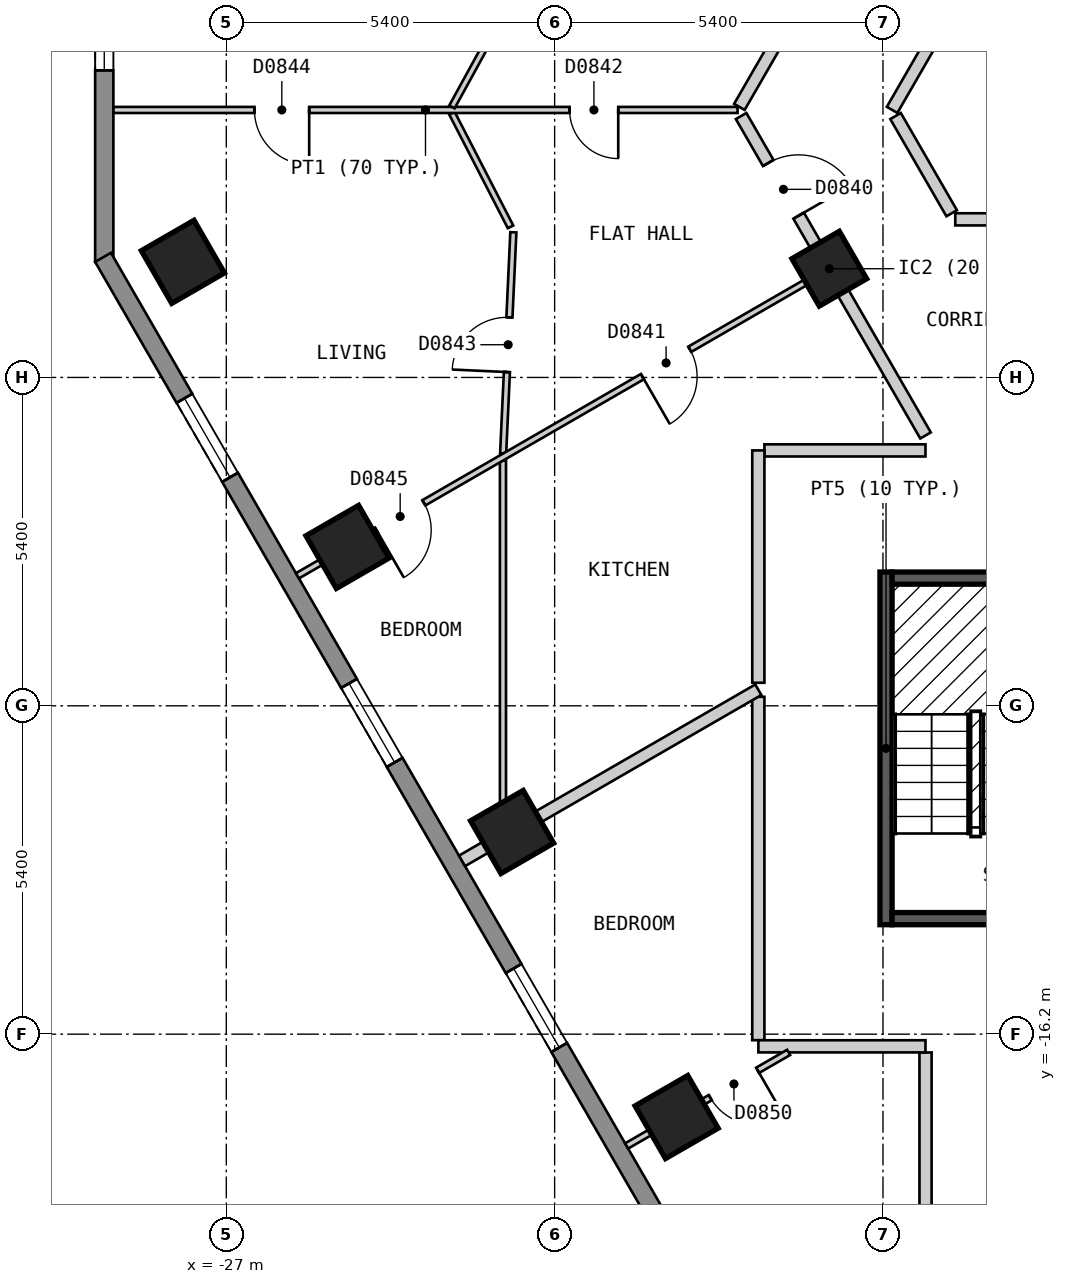
"""IFC4 building model, lengths in metres.
Left out: names, types, materials, properties, quantities, classifications, styles, units other than length and angle.
Written with IfcOpenShell. Run it as: python <this file> out.ifc"""

import sys

from ifc_helpers import new_model, si_unit, direction, frame, frame_2d, origin, origin_2d, place, context, subcontext, project, spatial, polyline, rectangle, outline, extrude, element, fill, save


model = new_model("IFC4")
c1 = context("Model", 3, precision=1e-05, world=origin(), true_north=direction((0.0, 1.0)))
c2 = subcontext(c1, "Body", "Model", "MODEL_VIEW")
j1 = project(units=[si_unit("LENGTHUNIT", "METRE"), si_unit("PLANEANGLEUNIT", "RADIAN")], contexts=[c1])
p1 = place(None, origin())
s1 = spatial("IfcSite", under=j1, at=p1, CompositionType="ELEMENT")
p2 = place(p1, origin())
s2 = spatial("IfcBuilding", under=s1, at=p2, CompositionType="ELEMENT")
p3 = place(p2, frame((0.0, 0.0, 84.0)))
s3 = spatial("IfcBuildingStorey", under=s2, at=p3, CompositionType="ELEMENT", Elevation=84.0)
for number, where, z_axis, x_axis in (
    (1, (-27.714, -3.499, 0.0), (0.0, 0.0, 1.0), (0.5, -0.866, 0.0)),
    (2, (-25.007, -8.187, 0.0), (0.0, 0.0, 1.0), (0.5, -0.866, 0.0)),
    (3, (-22.3, -12.875, 0.0), (0.0, 0.0, 1.0), (0.5, -0.866, 0.0)),
    (4, (-19.594, -17.563, 0.0), (0.0, 0.0, 1.0), (0.5, -0.866, 0.0)),
):
    element("IfcColumn", number, at=place(p3, frame(where, z_axis=z_axis, x_axis=x_axis)), inside=s3, PredefinedType="COLUMN", context=c2, shape_type="SweptSolid", body=[
        extrude(rectangle(XDim=1.0, YDim=1.0, at=origin_2d()), origin(), (0.0, 0.0, 1.0), 3.0),
    ])
p4 = place(p3, frame((-17.083, -3.612, 0.0), z_axis=(0.0, 0.0, 1.0), x_axis=(0.5, -0.866025403784, 0.0)))
e5 = element("IfcColumn", 5, at=p4, inside=s3, PredefinedType="COLUMN", context=c2, shape_type="SweptSolid", body=[
    extrude(rectangle(XDim=0.9, YDim=0.9, at=origin_2d()), origin(), (0.0, 0.0, 1.0), 3.0),
])
p5 = place(p3, frame((-29.007, 1.5, 0.0), z_axis=(0.0, 0.0, 1.0), x_axis=(0.0, -1.0, 0.0)))
e6 = element("IfcWall", 6, at=p5, inside=s3, PredefinedType="SOLIDWALL", context=c2, shape_type="SweptSolid", body=[
    extrude(outline(polyline([(0.0, -0.15), (5.0, -0.15), (4.92, 0.15), (0.08, 0.15), (0.0, -0.15)])), origin(), (0.0, 0.0, 1.0), 2.7),
])
p6 = place(p5, frame((0.65, 0.0, 0.15)))
e7 = element("IfcOpeningElement", 7, at=p6, cuts=e6, PredefinedType="OPENING", context=c2, shape_type="SweptSolid", body=[
    extrude(rectangle(XDim=1.2, YDim=2.1, at=frame_2d((0.6, 1.05))), frame((0.0, 0.16, 0.0), z_axis=(0.0, -1.0, 0.0), x_axis=(1.0, 0.0, 0.0)), (0.0, 0.0, 1.0), 0.32),
])
p7 = place(p3, frame((-29.027, -3.425, 0.0), z_axis=(0.0, 0.0, 1.0), x_axis=(0.500035407905, -0.866004960056, 0.0)))
e8 = element("IfcWall", 8, at=p7, inside=s3, PredefinedType="SOLIDWALL", context=c2, shape_type="SweptSolid", body=[
    extrude(outline(polyline([(0.0, -0.15), (23.094, -0.15), (23.014, 0.15), (0.08, 0.15), (0.0, -0.15)])), origin(), (0.0, 0.0, 1.0), 2.7),
])
p8 = place(p7, frame((2.677, 0.0, 0.15)))
e9 = element("IfcOpeningElement", 9, at=p8, cuts=e8, PredefinedType="OPENING", context=c2, shape_type="SweptSolid", body=[
    extrude(rectangle(XDim=1.5, YDim=2.1, at=frame_2d((0.75, 1.05))), frame((0.0, 0.16, 0.0), z_axis=(0.0, -1.0, 0.0), x_axis=(1.0, 0.0, 0.0)), (0.0, 0.0, 1.0), 0.32),
])
p9 = place(p7, frame((8.091, 0.0, 0.15)))
e10 = element("IfcOpeningElement", 10, at=p9, cuts=e8, PredefinedType="OPENING", context=c2, shape_type="SweptSolid", body=[
    extrude(rectangle(XDim=1.5, YDim=2.1, at=frame_2d((0.75, 1.05))), frame((0.0, 0.16, 0.0), z_axis=(0.0, -1.0, 0.0), x_axis=(1.0, 0.0, 0.0)), (0.0, 0.0, 1.0), 0.32),
])
p10 = place(p7, frame((13.504, 0.0, 0.15)))
e11 = element("IfcOpeningElement", 11, at=p10, cuts=e8, PredefinedType="OPENING", context=c2, shape_type="SweptSolid", body=[
    extrude(rectangle(XDim=1.5, YDim=2.1, at=frame_2d((0.75, 1.05))), frame((0.0, 0.16, 0.0), z_axis=(0.0, -1.0, 0.0), x_axis=(1.0, 0.0, 0.0)), (0.0, 0.0, 1.0), 0.32),
])
p11 = place(p7, frame((18.917, 0.0, 0.15)))
e12 = element("IfcOpeningElement", 12, at=p11, cuts=e8, PredefinedType="OPENING", context=c2, shape_type="SweptSolid", body=[
    extrude(rectangle(XDim=1.5, YDim=2.1, at=frame_2d((0.75, 1.05))), frame((0.0, 0.16, 0.0), z_axis=(0.0, -1.0, 0.0), x_axis=(1.0, 0.0, 0.0)), (0.0, 0.0, 1.0), 0.32),
])
p12 = place(p3, frame((-15.993, -1.101, 0.0), z_axis=(0.0, 0.0, 1.0), x_axis=(0.499894174133, -0.866086493757, 0.0)))
e13 = element("IfcWall", 13, at=p12, inside=s3, PredefinedType="PARTITIONING", context=c2, shape_type="SweptSolid", body=[
    extrude(rectangle(XDim=1.846, YDim=0.2, at=frame_2d((0.923, 0.0))), origin(), (0.0, 0.0, 1.0), 2.7),
])
p13 = place(p3, frame((-18.533, -1.101, 0.0), z_axis=(0.0, 0.0, 1.0), x_axis=(0.500022085096, -0.866012652573, 0.0)))
e14 = element("IfcWall", 14, at=p13, inside=s3, PredefinedType="PARTITIONING", context=c2, shape_type="SweptSolid", body=[
    extrude(rectangle(XDim=6.066, YDim=0.2, at=frame_2d((3.033, 0.0))), origin(), (0.0, 0.0, 1.0), 2.7),
])
p14 = place(p13, frame((0.892, 0.0, 0.0)))
e15 = element("IfcOpeningElement", 15, at=p14, cuts=e14, PredefinedType="OPENING", context=c2, shape_type="SweptSolid", body=[
    extrude(rectangle(XDim=1.0, YDim=2.1, at=frame_2d((0.5, 1.05))), frame((0.0, 0.11, 0.0), z_axis=(0.0, -1.0, 0.0), x_axis=(1.0, 0.0, 0.0)), (0.0, 0.0, 1.0), 0.22),
])
p15 = place(p3, frame((-15.5, -16.501, 0.0), z_axis=(0.0, 0.0, 1.0), x_axis=(0.0, -1.0, 0.0)))
e16 = element("IfcWall", 16, at=p15, inside=s3, PredefinedType="PARTITIONING", context=c2, shape_type="SweptSolid", body=[
    extrude(rectangle(XDim=4.598, YDim=0.2, at=frame_2d((2.299, 0.0))), origin(), (0.0, 0.0, 1.0), 2.7),
])
p16 = place(p3, frame((-18.25, -10.652, 0.0), z_axis=(0.0, 0.0, 1.0), x_axis=(0.0, -1.0, 0.0)))
e17 = element("IfcWall", 17, at=p16, inside=s3, PredefinedType="PARTITIONING", context=c2, shape_type="SweptSolid", body=[
    extrude(rectangle(XDim=5.647, YDim=0.2, at=frame_2d((2.823, 0.0))), origin(), (0.0, 0.0, 1.0), 2.7),
])
p17 = place(p3, frame((-18.15, -6.6, 0.0), z_axis=(0.0, 0.0, 1.0), x_axis=(1.0, 0.0, 0.0)))
e18 = element("IfcWall", 18, at=p17, inside=s3, PredefinedType="PARTITIONING", context=c2, shape_type="SweptSolid", body=[
    extrude(rectangle(XDim=2.649, YDim=0.2, at=frame_2d((1.324, 0.0))), origin(), (0.0, 0.0, 1.0), 2.7),
])
p18 = place(p3, frame((-18.249, -16.4, 0.0), z_axis=(0.0, 0.0, 1.0), x_axis=(1.0, 0.0, 0.0)))
e19 = element("IfcWall", 19, at=p18, inside=s3, PredefinedType="PARTITIONING", context=c2, shape_type="SweptSolid", body=[
    extrude(rectangle(XDim=2.748, YDim=0.2, at=frame_2d((1.374, 0.0))), origin(), (0.0, 0.0, 1.0), 2.7),
])
p19 = place(p3, frame((-15.011, -2.8, 0.0), z_axis=(0.0, 0.0, 1.0), x_axis=(1.0, 0.0, 0.0)))
e20 = element("IfcWall", 20, at=p19, inside=s3, PredefinedType="PARTITIONING", context=c2, shape_type="SweptSolid", body=[
    extrude(rectangle(XDim=7.982, YDim=0.2, at=frame_2d((3.991, 0.0))), origin(), (0.0, 0.0, 1.0), 2.7),
])
p20 = place(p3, frame((-16.05, -1.0, 0.0), z_axis=(0.0, 0.0, 1.0), x_axis=(0.499962449088, 0.866047082728, 0.0)))
e21 = element("IfcWall", 21, at=p20, inside=s3, PredefinedType="PARTITIONING", context=c2, shape_type="SweptSolid", body=[
    extrude(rectangle(XDim=10.391, YDim=0.2, at=frame_2d((5.195, 0.0))), origin(), (0.0, 0.0, 1.0), 2.7),
])
p21 = place(p20, frame((4.745, 0.0, 0.0)))
e22 = element("IfcOpeningElement", 22, at=p21, cuts=e21, PredefinedType="OPENING", context=c2, shape_type="SweptSolid", body=[
    extrude(rectangle(XDim=0.9, YDim=2.1, at=frame_2d((0.45, 1.05))), frame((0.0, 0.11, 0.0), z_axis=(0.0, -1.0, 0.0), x_axis=(1.0, 0.0, 0.0)), (0.0, 0.0, 1.0), 0.22),
])
p22 = place(p3, frame((-18.562, -0.951, 0.0), z_axis=(0.0, 0.0, 1.0), x_axis=(0.499992962407, 0.866029466902, 0.0)))
e23 = element("IfcWall", 23, at=p22, inside=s3, PredefinedType="PARTITIONING", context=c2, shape_type="SweptSolid", body=[
    extrude(rectangle(XDim=20.208, YDim=0.2, at=frame_2d((10.104, 0.0))), origin(), (0.0, 0.0, 1.0), 2.7),
])
p23 = place(p22, frame((14.627, 0.0, 0.0)))
e24 = element("IfcOpeningElement", 24, at=p23, cuts=e23, PredefinedType="OPENING", context=c2, shape_type="SweptSolid", body=[
    extrude(rectangle(XDim=1.0, YDim=2.1, at=frame_2d((0.5, 1.05))), frame((0.0, 0.11, 0.0), z_axis=(0.0, -1.0, 0.0), x_axis=(1.0, 0.0, 0.0)), (0.0, 0.0, 1.0), 0.22),
])
p24 = place(p22, frame((4.581, 0.0, 0.0)))
e25 = element("IfcOpeningElement", 25, at=p24, cuts=e23, PredefinedType="OPENING", context=c2, shape_type="SweptSolid", body=[
    extrude(rectangle(XDim=1.0, YDim=2.1, at=frame_2d((0.5, 1.05))), frame((0.0, 0.11, 0.0), z_axis=(0.0, -1.0, 0.0), x_axis=(1.0, 0.0, 0.0)), (0.0, 0.0, 1.0), 0.22),
])
p25 = place(p3, frame((-18.25, -10.421, 0.0), z_axis=(0.0, 0.0, 1.0), x_axis=(0.0, 1.0, 0.0)))
e26 = element("IfcWall", 26, at=p25, inside=s3, PredefinedType="PARTITIONING", context=c2, shape_type="SweptSolid", body=[
    extrude(rectangle(XDim=3.821, YDim=0.2, at=frame_2d((1.91, 0.0))), origin(), (0.0, 0.0, 1.0), 2.7),
])
p26 = place(p3, frame((-23.289, -1.054, 0.0), z_axis=(0.0, 0.0, 1.0), x_axis=(0.458226112305, -0.888835659726, 0.0)))
e27 = element("IfcWall", 27, at=p26, inside=s3, PredefinedType="PARTITIONING", context=c2, shape_type="SweptSolid", body=[
    extrude(rectangle(XDim=2.104, YDim=0.1, at=frame_2d((1.052, 0.0))), origin(), (0.0, 0.0, 1.0), 2.7),
])
p27 = place(p3, frame((-28.857, -1.001, 0.0), z_axis=(0.0, 0.0, 1.0), x_axis=(1.0, 0.0, 0.0)))
e28 = element("IfcWall", 28, at=p27, inside=s3, PredefinedType="PARTITIONING", context=c2, shape_type="SweptSolid", body=[
    extrude(rectangle(XDim=10.266, YDim=0.1, at=frame_2d((5.133, 0.0))), origin(), (0.0, 0.0, 1.0), 2.7),
])
p28 = place(p27, frame((7.503, 0.0, 0.0)))
e29 = element("IfcOpeningElement", 29, at=p28, cuts=e28, PredefinedType="OPENING", context=c2, shape_type="SweptSolid", body=[
    extrude(rectangle(XDim=0.8, YDim=2.1, at=frame_2d((0.4, 1.05))), frame((0.0, 0.06, 0.0), z_axis=(0.0, -1.0, 0.0), x_axis=(1.0, 0.0, 0.0)), (0.0, 0.0, 1.0), 0.12),
])
p29 = place(p27, frame((2.32, 0.0, 0.0)))
e30 = element("IfcOpeningElement", 30, at=p29, cuts=e28, PredefinedType="OPENING", context=c2, shape_type="SweptSolid", body=[
    extrude(rectangle(XDim=0.9, YDim=2.1, at=frame_2d((0.45, 1.05))), frame((0.0, 0.06, 0.0), z_axis=(0.0, -1.0, 0.0), x_axis=(1.0, 0.0, 0.0)), (0.0, 0.0, 1.0), 0.12),
])
p30 = place(p3, frame((-23.289, -0.951, 0.0), z_axis=(0.0, 0.0, 1.0), x_axis=(0.481164463081, 0.876630343684, 0.0)))
e31 = element("IfcWall", 31, at=p30, inside=s3, PredefinedType="PARTITIONING", context=c2, shape_type="SweptSolid", body=[
    extrude(rectangle(XDim=4.834, YDim=0.1, at=frame_2d((2.417, 0.0))), origin(), (0.0, 0.0, 1.0), 2.7),
])
p31 = place(p3, frame((-22.447, -6.651, 0.0), z_axis=(0.0, 0.0, 1.0), x_axis=(0.046122262393, 0.998935802197, 0.0)))
e32 = element("IfcWall", 32, at=p31, inside=s3, PredefinedType="PARTITIONING", context=c2, shape_type="SweptSolid", body=[
    extrude(rectangle(XDim=3.642, YDim=0.1, at=frame_2d((1.821, 0.0))), origin(), (0.0, 0.0, 1.0), 2.7),
])
p32 = place(p31, frame((1.341, 0.0, 0.0)))
e33 = element("IfcOpeningElement", 33, at=p32, cuts=e32, PredefinedType="OPENING", context=c2, shape_type="SweptSolid", body=[
    extrude(rectangle(XDim=0.9, YDim=2.1, at=frame_2d((0.45, 1.05))), frame((0.0, 0.06, 0.0), z_axis=(0.0, -1.0, 0.0), x_axis=(1.0, 0.0, 0.0)), (0.0, 0.0, 1.0), 0.12),
])
p33 = place(p3, frame((-22.45, -12.846, 0.0), z_axis=(0.0, 0.0, 1.0), x_axis=(0.0, 1.0, 0.0)))
e34 = element("IfcWall", 34, at=p33, inside=s3, PredefinedType="PARTITIONING", context=c2, shape_type="SweptSolid", body=[
    extrude(rectangle(XDim=6.078, YDim=0.1, at=frame_2d((3.039, 0.0))), origin(), (0.0, 0.0, 1.0), 2.7),
])
p34 = place(p3, frame((-20.416, -18.038, 0.0), z_axis=(0.0, 0.0, 1.0), x_axis=(0.866026989333, 0.499997253739, 0.0)))
e35 = element("IfcWall", 35, at=p34, inside=s3, PredefinedType="PARTITIONING", context=c2, shape_type="SweptSolid", body=[
    extrude(rectangle(XDim=3.076, YDim=0.1, at=frame_2d((1.538, 0.0))), origin(), (0.0, 0.0, 1.0), 2.7),
])
p35 = place(p34, frame((1.588, 0.0, 0.0)))
e36 = element("IfcOpeningElement", 36, at=p35, cuts=e35, PredefinedType="OPENING", context=c2, shape_type="SweptSolid", body=[
    extrude(rectangle(XDim=0.9, YDim=2.1, at=frame_2d((0.45, 1.05))), frame((0.0, 0.06, 0.0), z_axis=(0.0, -1.0, 0.0), x_axis=(1.0, 0.0, 0.0)), (0.0, 0.0, 1.0), 0.12),
])
p36 = place(p3, frame((-25.83, -8.662, 0.0), z_axis=(0.0, 0.0, 1.0), x_axis=(0.866022959057, 0.500004234368, 0.0)))
e37 = element("IfcWall", 37, at=p36, inside=s3, PredefinedType="PARTITIONING", context=c2, shape_type="SweptSolid", body=[
    extrude(rectangle(XDim=10.0, YDim=0.1, at=frame_2d((5.0, 0.0))), origin(), (0.0, 0.0, 1.0), 2.7),
])
p37 = place(p36, frame((6.551, 0.0, 0.0)))
e38 = element("IfcOpeningElement", 38, at=p37, cuts=e37, PredefinedType="OPENING", context=c2, shape_type="SweptSolid", body=[
    extrude(rectangle(XDim=0.9, YDim=2.1, at=frame_2d((0.45, 1.05))), frame((0.0, 0.06, 0.0), z_axis=(0.0, -1.0, 0.0), x_axis=(1.0, 0.0, 0.0)), (0.0, 0.0, 1.0), 0.12),
])
p38 = place(p36, frame((1.501, 0.0, 0.0)))
e39 = element("IfcOpeningElement", 39, at=p38, cuts=e37, PredefinedType="OPENING", context=c2, shape_type="SweptSolid", body=[
    extrude(rectangle(XDim=0.9, YDim=2.1, at=frame_2d((0.45, 1.05))), frame((0.0, 0.06, 0.0), z_axis=(0.0, -1.0, 0.0), x_axis=(1.0, 0.0, 0.0)), (0.0, 0.0, 1.0), 0.12),
])
p39 = place(p3, frame((-23.123, -13.35, 0.0), z_axis=(0.0, 0.0, 1.0), x_axis=(0.86596737403, 0.500100497016, 0.0)))
e40 = element("IfcWall", 40, at=p39, inside=s3, PredefinedType="PARTITIONING", context=c2, shape_type="SweptSolid", body=[
    extrude(rectangle(XDim=5.627, YDim=0.2, at=frame_2d((2.813, 0.0))), origin(), (0.0, 0.0, 1.0), 2.7),
])
p40 = place(p3, frame((-16.15, -14.4, 0.0), z_axis=(0.0, 0.0, 1.0), x_axis=(0.0, 1.0, 0.0)))
e41 = element("IfcWall", 41, at=p40, inside=s3, PredefinedType="SOLIDWALL", context=c2, shape_type="SweptSolid", body=[
    extrude(rectangle(XDim=5.8, YDim=0.2, at=frame_2d((2.9, 0.0))), origin(), (0.0, 0.0, 1.0), 2.7),
])
for number, where, z_axis, x_axis in (
    (42, (-16.05, -14.3, 0.0), (0.0, 0.0, 1.0), (1.0, 0.0, 0.0)),
    (43, (-16.05, -8.7, 0.0), (0.0, 0.0, 1.0), (1.0, 0.0, 0.0)),
):
    element("IfcWall", number, at=place(p3, frame(where, z_axis=z_axis, x_axis=x_axis)), inside=s3, PredefinedType="SOLIDWALL", context=c2, shape_type="SweptSolid", body=[
        extrude(rectangle(XDim=2.75, YDim=0.2, at=frame_2d((1.375, 0.0))), origin(), (0.0, 0.0, 1.0), 2.7),
    ])
p41 = place(p6, origin())
e44 = element("IfcWindow", 44, at=p41, inside=s3, PartitioningType="SINGLE_PANEL", PredefinedType="WINDOW", context=c2, shape_type="SweptSolid", body=[
    extrude(rectangle(XDim=1.2, YDim=2.1, at=frame_2d((0.6, 1.05))), frame((0.0, 0.03, 0.0), z_axis=(0.0, -1.0, 0.0), x_axis=(1.0, 0.0, 0.0)), (0.0, 0.0, 1.0), 0.06),
])
fill(e7, e44)
p42 = place(p8, origin())
e45 = element("IfcWindow", 45, at=p42, inside=s3, PartitioningType="SINGLE_PANEL", PredefinedType="WINDOW", context=c2, shape_type="SweptSolid", body=[
    extrude(rectangle(XDim=1.5, YDim=2.1, at=frame_2d((0.75, 1.05))), frame((0.0, 0.03, 0.0), z_axis=(0.0, -1.0, 0.0), x_axis=(1.0, 0.0, 0.0)), (0.0, 0.0, 1.0), 0.06),
])
fill(e9, e45)
p43 = place(p9, origin())
e46 = element("IfcWindow", 46, at=p43, inside=s3, PartitioningType="SINGLE_PANEL", PredefinedType="WINDOW", context=c2, shape_type="SweptSolid", body=[
    extrude(rectangle(XDim=1.5, YDim=2.1, at=frame_2d((0.75, 1.05))), frame((0.0, 0.03, 0.0), z_axis=(0.0, -1.0, 0.0), x_axis=(1.0, 0.0, 0.0)), (0.0, 0.0, 1.0), 0.06),
])
fill(e10, e46)
p44 = place(p10, origin())
e47 = element("IfcWindow", 47, at=p44, inside=s3, PartitioningType="SINGLE_PANEL", PredefinedType="WINDOW", context=c2, shape_type="SweptSolid", body=[
    extrude(rectangle(XDim=1.5, YDim=2.1, at=frame_2d((0.75, 1.05))), frame((0.0, 0.03, 0.0), z_axis=(0.0, -1.0, 0.0), x_axis=(1.0, 0.0, 0.0)), (0.0, 0.0, 1.0), 0.06),
])
fill(e11, e47)
p45 = place(p14, origin())
e48 = element("IfcDoor", 48, at=p45, inside=s3, OperationType="SINGLE_SWING_RIGHT", PredefinedType="DOOR", context=c2, shape_type="SweptSolid", body=[
    extrude(rectangle(XDim=1.0, YDim=2.1, at=frame_2d((0.5, 1.05))), frame((0.0, 0.025, 0.0), z_axis=(0.0, -1.0, 0.0), x_axis=(1.0, 0.0, 0.0)), (0.0, 0.0, 1.0), 0.05),
])
fill(e15, e48)
p46 = place(p37, origin())
e49 = element("IfcDoor", 49, at=p46, inside=s3, OperationType="SINGLE_SWING_LEFT", PredefinedType="DOOR", context=c2, shape_type="SweptSolid", body=[
    extrude(rectangle(XDim=0.9, YDim=2.1, at=frame_2d((0.45, 1.05))), frame((0.0, 0.025, 0.0), z_axis=(0.0, -1.0, 0.0), x_axis=(1.0, 0.0, 0.0)), (0.0, 0.0, 1.0), 0.05),
])
fill(e38, e49)
p47 = place(p28, origin())
e50 = element("IfcDoor", 50, at=p47, inside=s3, OperationType="SINGLE_SWING_RIGHT", PredefinedType="DOOR", context=c2, shape_type="SweptSolid", body=[
    extrude(rectangle(XDim=0.8, YDim=2.1, at=frame_2d((0.4, 1.05))), frame((0.0, 0.025, 0.0), z_axis=(0.0, -1.0, 0.0), x_axis=(1.0, 0.0, 0.0)), (0.0, 0.0, 1.0), 0.05),
])
fill(e29, e50)
p48 = place(p32, origin())
e51 = element("IfcDoor", 51, at=p48, inside=s3, OperationType="SINGLE_SWING_LEFT", PredefinedType="DOOR", context=c2, shape_type="SweptSolid", body=[
    extrude(rectangle(XDim=0.9, YDim=2.1, at=frame_2d((0.45, 1.05))), frame((0.0, 0.025, 0.0), z_axis=(0.0, -1.0, 0.0), x_axis=(1.0, 0.0, 0.0)), (0.0, 0.0, 1.0), 0.05),
])
fill(e33, e51)
p49 = place(p29, origin())
e52 = element("IfcDoor", 52, at=p49, inside=s3, OperationType="SINGLE_SWING_RIGHT", PredefinedType="DOOR", context=c2, shape_type="SweptSolid", body=[
    extrude(rectangle(XDim=0.9, YDim=2.1, at=frame_2d((0.45, 1.05))), frame((0.0, 0.025, 0.0), z_axis=(0.0, -1.0, 0.0), x_axis=(1.0, 0.0, 0.0)), (0.0, 0.0, 1.0), 0.05),
])
fill(e30, e52)
p50 = place(p38, origin())
e53 = element("IfcDoor", 53, at=p50, inside=s3, OperationType="SINGLE_SWING_LEFT", PredefinedType="DOOR", context=c2, shape_type="SweptSolid", body=[
    extrude(rectangle(XDim=0.9, YDim=2.1, at=frame_2d((0.45, 1.05))), frame((0.0, 0.025, 0.0), z_axis=(0.0, -1.0, 0.0), x_axis=(1.0, 0.0, 0.0)), (0.0, 0.0, 1.0), 0.05),
])
fill(e39, e53)
p51 = place(p35, origin())
e54 = element("IfcDoor", 54, at=p51, inside=s3, OperationType="SINGLE_SWING_RIGHT", PredefinedType="DOOR", context=c2, shape_type="SweptSolid", body=[
    extrude(rectangle(XDim=0.9, YDim=2.1, at=frame_2d((0.45, 1.05))), frame((0.0, 0.025, 0.0), z_axis=(0.0, -1.0, 0.0), x_axis=(1.0, 0.0, 0.0)), (0.0, 0.0, 1.0), 0.05),
])
fill(e36, e54)
save(model, sys.argv[1])
